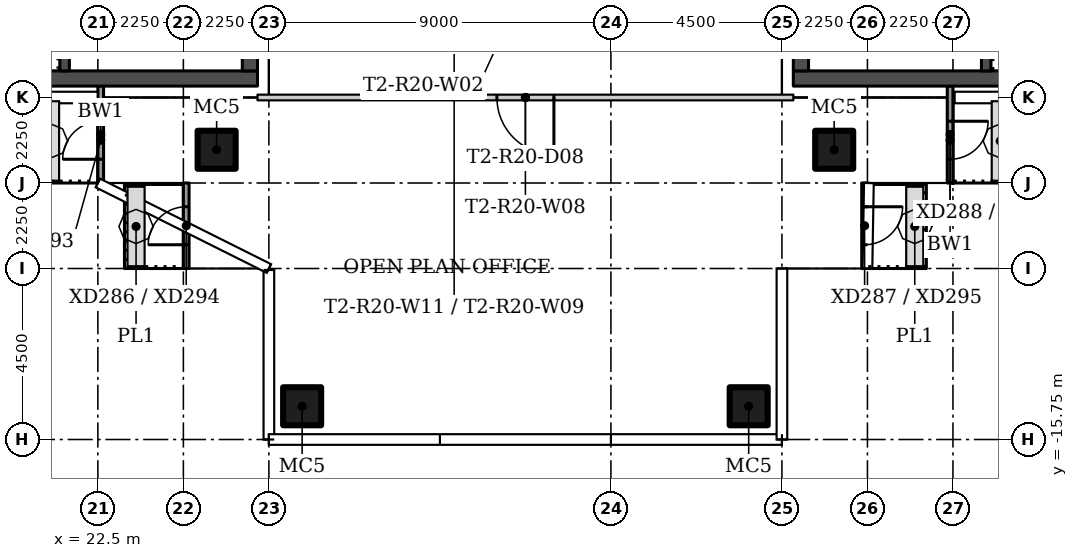
"""IFC4 building model, lengths in metres.
Left out: names, types, materials, properties, quantities, classifications, styles, units other than length and angle.
Written with IfcOpenShell. Run it as: python <this file> out.ifc"""

import sys

from ifc_helpers import new_model, si_unit, direction, frame, frame_2d, origin, origin_2d, place, context, subcontext, project, spatial, rectangle, hollow_rectangle, extrude, element, fill, save


model = new_model("IFC4")
c1 = context("Model", 3, precision=1e-05, world=origin(), true_north=direction((0.0, 1.0)))
c2 = subcontext(c1, "Body", "Model", "MODEL_VIEW")
j1 = project(units=[si_unit("LENGTHUNIT", "METRE"), si_unit("PLANEANGLEUNIT", "RADIAN")], contexts=[c1])
p1 = place(None, origin())
s1 = spatial("IfcSite", under=j1, at=p1, CompositionType="ELEMENT")
p2 = place(p1, origin())
s2 = spatial("IfcBuilding", under=s1, at=p2, CompositionType="ELEMENT")
p3 = place(p2, frame((0.0, 0.0, 186.6)))
s3 = spatial("IfcBuildingStorey", under=s2, at=p3, CompositionType="ELEMENT", Elevation=186.6)
for number, where in (
    (1, (25.625, -8.125, 0.0)),
    (2, (41.875, -8.125, 0.0)),
    (3, (39.625, -14.875, 0.0)),
    (4, (27.875, -14.875, 0.0)),
):
    element("IfcColumn", number, at=place(p3, frame(where)), inside=s3, PredefinedType="COLUMN", context=c2, shape_type="SweptSolid", body=[
        extrude(hollow_rectangle(XDim=1.0, YDim=1.0, WallThickness=0.04, at=origin_2d()), origin(), (0.0, 0.0, 1.0), 3.55),
    ])
p4 = place(p3, frame((40.8, -6.75, 0.0), z_axis=(0.0, 0.0, 1.0), x_axis=(-1.0, 0.0, 0.0)))
e5 = element("IfcWall", 5, at=p4, inside=s3, PredefinedType="PARTITIONING", context=c2, shape_type="SweptSolid", body=[
    extrude(rectangle(XDim=14.1, YDim=0.15, at=frame_2d((7.05, 0.0))), origin(), (0.0, 0.0, 1.0), 3.55),
])
p5 = place(p4, frame((6.3, 0.0, 0.0)))
e6 = element("IfcOpeningElement", 6, at=p5, cuts=e5, PredefinedType="OPENING", context=c2, shape_type="SweptSolid", body=[
    extrude(rectangle(XDim=1.5, YDim=2.1, at=frame_2d((0.75, 1.05))), frame((0.0, 0.085, 0.0), z_axis=(0.0, -1.0, 0.0), x_axis=(1.0, 0.0, 0.0)), (0.0, 0.0, 1.0), 0.17),
])
p6 = place(p3, frame((22.575, -9.0, 0.0), z_axis=(0.0, 0.0, 1.0), x_axis=(0.0, 1.0, 0.0)))
e7 = element("IfcWall", 7, at=p6, inside=s3, PredefinedType="SOLIDWALL", context=c2, shape_type="SweptSolid", body=[
    extrude(rectangle(XDim=2.557, YDim=0.15, at=frame_2d((1.278, 0.0))), origin(), (0.0, 0.0, 1.0), 3.45),
])
p7 = place(p6, frame((0.625, 0.0, 0.0)))
e8 = element("IfcOpeningElement", 8, at=p7, cuts=e7, PredefinedType="OPENING", context=c2, shape_type="SweptSolid", body=[
    extrude(rectangle(XDim=1.0, YDim=2.4, at=frame_2d((0.5, 1.2))), frame((0.0, 0.085, 0.0), z_axis=(0.0, -1.0, 0.0), x_axis=(1.0, 0.0, 0.0)), (0.0, 0.0, 1.0), 0.17),
])
p8 = place(p3, frame((24.825, -11.25, 0.0), z_axis=(0.0, 0.0, 1.0), x_axis=(0.0, 1.0, 0.0)))
e9 = element("IfcWall", 9, at=p8, inside=s3, PredefinedType="SOLIDWALL", context=c2, shape_type="SweptSolid", body=[
    extrude(rectangle(XDim=2.25, YDim=0.15, at=frame_2d((1.125, 0.0))), origin(), (0.0, 0.0, 1.0), 3.45),
])
p9 = place(p8, frame((0.625, 0.0, 0.0)))
e10 = element("IfcOpeningElement", 10, at=p9, cuts=e9, PredefinedType="OPENING", context=c2, shape_type="SweptSolid", body=[
    extrude(rectangle(XDim=1.0, YDim=2.4, at=frame_2d((0.5, 1.2))), frame((0.0, 0.085, 0.0), z_axis=(0.0, -1.0, 0.0), x_axis=(1.0, 0.0, 0.0)), (0.0, 0.0, 1.0), 0.17),
])
p10 = place(p3, frame((42.675, -9.0, 0.0), z_axis=(0.0, 0.0, 1.0), x_axis=(0.0, -1.0, 0.0)))
e11 = element("IfcWall", 11, at=p10, inside=s3, PredefinedType="SOLIDWALL", context=c2, shape_type="SweptSolid", body=[
    extrude(rectangle(XDim=2.25, YDim=0.15, at=frame_2d((1.125, 0.0))), origin(), (0.0, 0.0, 1.0), 3.45),
])
p11 = place(p10, frame((0.625, 0.0, 0.0)))
e12 = element("IfcOpeningElement", 12, at=p11, cuts=e11, PredefinedType="OPENING", context=c2, shape_type="SweptSolid", body=[
    extrude(rectangle(XDim=1.0, YDim=2.4, at=frame_2d((0.5, 1.2))), frame((0.0, 0.085, 0.0), z_axis=(0.0, -1.0, 0.0), x_axis=(1.0, 0.0, 0.0)), (0.0, 0.0, 1.0), 0.17),
])
p12 = place(p3, frame((44.925, -6.448, 0.0), z_axis=(0.0, 0.0, 1.0), x_axis=(0.0, -1.0, 0.0)))
e13 = element("IfcWall", 13, at=p12, inside=s3, PredefinedType="SOLIDWALL", context=c2, shape_type="SweptSolid", body=[
    extrude(rectangle(XDim=2.552, YDim=0.15, at=frame_2d((1.276, 0.0))), origin(), (0.0, 0.0, 1.0), 3.45),
])
p13 = place(p12, frame((0.927, 0.0, 0.0)))
e14 = element("IfcOpeningElement", 14, at=p13, cuts=e13, PredefinedType="OPENING", context=c2, shape_type="SweptSolid", body=[
    extrude(rectangle(XDim=1.0, YDim=2.4, at=frame_2d((0.5, 1.2))), frame((0.0, 0.085, 0.0), z_axis=(0.0, -1.0, 0.0), x_axis=(1.0, 0.0, 0.0)), (0.0, 0.0, 1.0), 0.17),
])
p14 = place(p3, frame((13.8, -6.25, 0.0)))
e15 = element("IfcWall", 15, at=p14, inside=s3, PredefinedType="SHEAR", context=c2, shape_type="SweptSolid", body=[
    extrude(rectangle(XDim=12.9, YDim=0.4, at=frame_2d((6.45, 0.0))), origin(), (0.0, 0.0, 1.0), 3.55),
])
p15 = place(p3, frame((26.5, 6.05, 0.0), z_axis=(0.0, 0.0, 1.0), x_axis=(0.0, -1.0, 0.0)))
e16 = element("IfcWall", 16, at=p15, inside=s3, PredefinedType="SHEAR", context=c2, shape_type="SweptSolid", body=[
    extrude(rectangle(XDim=12.1, YDim=0.4, at=frame_2d((6.05, 0.0))), origin(), (0.0, 0.0, 1.0), 3.55),
])
p16 = place(p15, frame((10.1, 0.0, 0.0)))
e17 = element("IfcOpeningElement", 17, at=p16, cuts=e16, PredefinedType="OPENING", context=c2, shape_type="SweptSolid", body=[
    extrude(rectangle(XDim=1.2, YDim=2.1, at=frame_2d((0.6, 1.05))), frame((0.0, 0.21, 0.0), z_axis=(0.0, -1.0, 0.0), x_axis=(1.0, 0.0, 0.0)), (0.0, 0.0, 1.0), 0.42),
])
p17 = place(p15, frame((3.9, 0.0, 0.0)))
e18 = element("IfcOpeningElement", 18, at=p17, cuts=e16, PredefinedType="OPENING", context=c2, shape_type="SweptSolid", body=[
    extrude(rectangle(XDim=1.8, YDim=2.4, at=frame_2d((0.9, 1.2))), frame((0.0, 0.21, 0.0), z_axis=(0.0, -1.0, 0.0), x_axis=(1.0, 0.0, 0.0)), (0.0, 0.0, 1.0), 0.42),
])
p18 = place(p3, frame((21.625, -6.05, 0.0), z_axis=(0.0, 0.0, 1.0), x_axis=(0.0, 1.0, 0.0)))
e19 = element("IfcWall", 19, at=p18, inside=s3, PredefinedType="SHEAR", context=c2, shape_type="SweptSolid", body=[
    extrude(rectangle(XDim=2.55, YDim=0.25, at=frame_2d((1.275, 0.0))), origin(), (0.0, 0.0, 1.0), 3.55),
])
p19 = place(p3, frame((53.7, -6.25, 0.0), z_axis=(0.0, 0.0, 1.0), x_axis=(-1.0, 0.0, 0.0)))
e20 = element("IfcWall", 20, at=p19, inside=s3, PredefinedType="SHEAR", context=c2, shape_type="SweptSolid", body=[
    extrude(rectangle(XDim=12.9, YDim=0.4, at=frame_2d((6.45, 0.0))), origin(), (0.0, 0.0, 1.0), 3.55),
])
p20 = place(p3, frame((41.0, -6.05, 0.0), z_axis=(0.0, 0.0, 1.0), x_axis=(0.0, 1.0, 0.0)))
e21 = element("IfcWall", 21, at=p20, inside=s3, PredefinedType="SHEAR", context=c2, shape_type="SweptSolid", body=[
    extrude(rectangle(XDim=12.1, YDim=0.4, at=frame_2d((6.05, 0.0))), origin(), (0.0, 0.0, 1.0), 3.55),
])
p21 = place(p20, frame((0.8, 0.0, 0.0)))
e22 = element("IfcOpeningElement", 22, at=p21, cuts=e21, PredefinedType="OPENING", context=c2, shape_type="SweptSolid", body=[
    extrude(rectangle(XDim=1.2, YDim=2.1, at=frame_2d((0.6, 1.05))), frame((0.0, 0.21, 0.0), z_axis=(0.0, -1.0, 0.0), x_axis=(1.0, 0.0, 0.0)), (0.0, 0.0, 1.0), 0.42),
])
p22 = place(p20, frame((6.4, 0.0, 0.0)))
e23 = element("IfcOpeningElement", 23, at=p22, cuts=e21, PredefinedType="OPENING", context=c2, shape_type="SweptSolid", body=[
    extrude(rectangle(XDim=1.8, YDim=2.4, at=frame_2d((0.9, 1.2))), frame((0.0, 0.21, 0.0), z_axis=(0.0, -1.0, 0.0), x_axis=(1.0, 0.0, 0.0)), (0.0, 0.0, 1.0), 0.42),
])
p23 = place(p3, frame((45.875, -6.05, 0.0), z_axis=(0.0, 0.0, 1.0), x_axis=(0.0, 1.0, 0.0)))
e24 = element("IfcWall", 24, at=p23, inside=s3, PredefinedType="SHEAR", context=c2, shape_type="SweptSolid", body=[
    extrude(rectangle(XDim=2.55, YDim=0.25, at=frame_2d((1.275, 0.0))), origin(), (0.0, 0.0, 1.0), 3.55),
])
p24 = place(p5, origin())
e25 = element("IfcDoor", 25, at=p24, inside=s3, OperationType="DOUBLE_DOOR_SINGLE_SWING", PredefinedType="DOOR", context=c2, shape_type="SweptSolid", body=[
    extrude(rectangle(XDim=1.5, YDim=2.1, at=frame_2d((0.75, 1.05))), frame((0.0, 0.025, 0.0), z_axis=(0.0, -1.0, 0.0), x_axis=(1.0, 0.0, 0.0)), (0.0, 0.0, 1.0), 0.05),
])
fill(e6, e25)
p25 = place(p7, origin())
e26 = element("IfcDoor", 26, at=p25, inside=s3, OperationType="SINGLE_SWING_LEFT", PredefinedType="DOOR", context=c2, shape_type="SweptSolid", body=[
    extrude(rectangle(XDim=1.0, YDim=2.4, at=frame_2d((0.5, 1.2))), frame((0.0, 0.025, 0.0), z_axis=(0.0, -1.0, 0.0), x_axis=(1.0, 0.0, 0.0)), (0.0, 0.0, 1.0), 0.05),
])
fill(e8, e26)
p26 = place(p9, origin())
e27 = element("IfcDoor", 27, at=p26, inside=s3, OperationType="SINGLE_SWING_RIGHT", PredefinedType="DOOR", context=c2, shape_type="SweptSolid", body=[
    extrude(rectangle(XDim=1.0, YDim=2.4, at=frame_2d((0.5, 1.2))), frame((0.0, 0.025, 0.0), z_axis=(0.0, -1.0, 0.0), x_axis=(1.0, 0.0, 0.0)), (0.0, 0.0, 1.0), 0.05),
])
fill(e10, e27)
p27 = place(p11, origin())
e28 = element("IfcDoor", 28, at=p27, inside=s3, OperationType="SINGLE_SWING_LEFT", PredefinedType="DOOR", context=c2, shape_type="SweptSolid", body=[
    extrude(rectangle(XDim=1.0, YDim=2.4, at=frame_2d((0.5, 1.2))), frame((0.0, 0.025, 0.0), z_axis=(0.0, -1.0, 0.0), x_axis=(1.0, 0.0, 0.0)), (0.0, 0.0, 1.0), 0.05),
])
fill(e12, e28)
p28 = place(p13, origin())
e29 = element("IfcDoor", 29, at=p28, inside=s3, OperationType="SINGLE_SWING_RIGHT", PredefinedType="DOOR", context=c2, shape_type="SweptSolid", body=[
    extrude(rectangle(XDim=1.0, YDim=2.4, at=frame_2d((0.5, 1.2))), frame((0.0, 0.025, 0.0), z_axis=(0.0, -1.0, 0.0), x_axis=(1.0, 0.0, 0.0)), (0.0, 0.0, 1.0), 0.05),
])
fill(e14, e29)
save(model, sys.argv[1])
